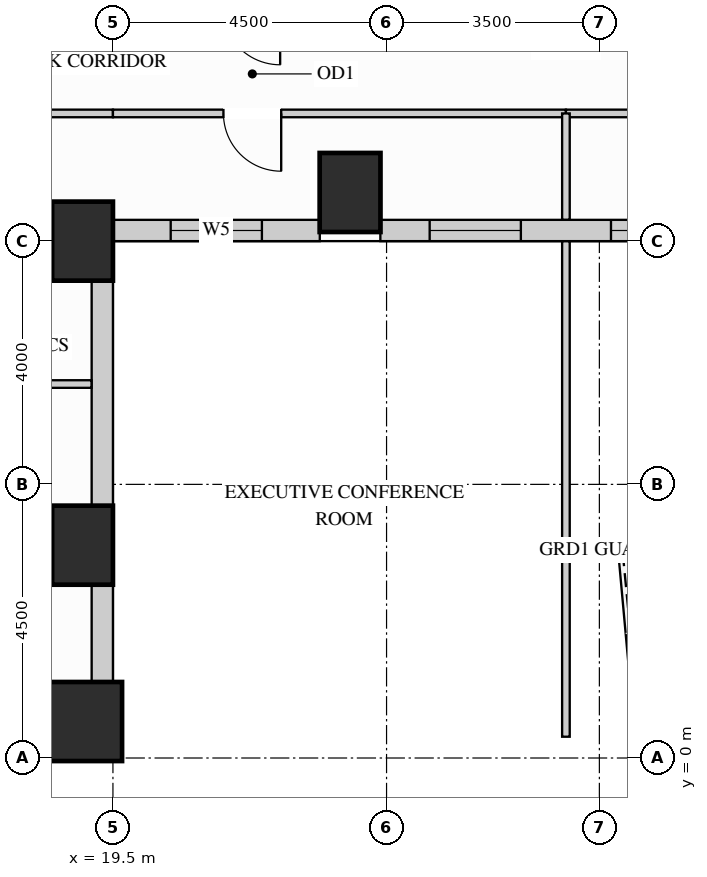
"""IFC4 building model, lengths in metres.
Left out: names, types, materials, properties, quantities, classifications, styles, units other than length and angle.
Written with IfcOpenShell. Run it as: python <this file> out.ifc"""

import sys

from ifc_helpers import new_model, si_unit, direction, frame, frame_2d, origin, origin_2d, place, context, subcontext, project, spatial, rectangle, extrude, source, transform, mapped, element, fill, save


model = new_model("IFC4")
c1 = context("Model", 3, precision=1e-05, world=origin(), true_north=direction((0.0, 1.0)))
c2 = subcontext(c1, "Body", "Model", "MODEL_VIEW")
j1 = project(units=[si_unit("LENGTHUNIT", "METRE"), si_unit("PLANEANGLEUNIT", "RADIAN")], contexts=[c1])
p1 = place(None, origin())
s1 = spatial("IfcSite", under=j1, at=p1, CompositionType="ELEMENT")
p2 = place(p1, origin())
s2 = spatial("IfcBuilding", under=s1, at=p2, CompositionType="ELEMENT")
p3 = place(p2, frame((0.0, 0.0, 62.1)))
s3 = spatial("IfcBuildingStorey", under=s2, at=p3, CompositionType="ELEMENT", Elevation=62.1)
m1 = source(origin(), c2, "Body", "SweptSolid", [
    extrude(rectangle(XDim=1.0, YDim=1.3, at=origin_2d()), origin(), (0.0, 0.0, 1.0), 3.38),
])
for number, where, z_axis, x_axis in (
    (1, (19.0, 3.5, 0.0), (0.0, 0.0, 1.0), (1.0, 0.0, 0.0)),
    (2, (19.0, 8.5, 0.0), (0.0, 0.0, 1.0), (1.0, 0.0, 0.0)),
    (3, (23.4, 9.3, 0.0), (0.0, 0.0, 1.0), (1.0, 0.0, 0.0)),
):
    element("IfcColumn", number, at=place(p3, frame(where, z_axis=z_axis, x_axis=x_axis)), inside=s3, PredefinedType="COLUMN", context=c2, shape_type="MappedRepresentation", body=[
        mapped(m1, transform((0.0, 0.0, 0.0), x_axis=(1.0, 0.0, 0.0), y_axis=(0.0, 1.0, 0.0), z_axis=(0.0, 0.0, 1.0))),
    ])
m2 = source(origin(), c2, "Body", "SweptSolid", [
    extrude(rectangle(XDim=1.3, YDim=1.3, at=origin_2d()), origin(), (0.0, 0.0, 1.0), 3.38),
])
p4 = place(p3, frame((19.0, 0.6, 0.0), z_axis=(0.0, 0.0, 1.0), x_axis=(1.0, 0.0, 0.0)))
e4 = element("IfcColumn", 4, at=p4, inside=s3, PredefinedType="COLUMN", context=c2, shape_type="MappedRepresentation", body=[
    mapped(m2, transform((0.0, 0.0, 0.0), x_axis=(1.0, 0.0, 0.0), y_axis=(0.0, 1.0, 0.0), z_axis=(0.0, 0.0, 1.0))),
])
m3 = source(origin(), c2, "Body", "SweptSolid", [
    extrude(rectangle(XDim=1.604, YDim=0.35, at=frame_2d((0.802, 0.0))), origin(), (0.0, 0.0, 1.0), 2.51),
])
p5 = place(p3, frame((19.325, 1.248, 0.0), z_axis=(0.0, 0.0, 1.0), x_axis=(0.0, 1.0, 0.0)))
e5 = element("IfcWall", 5, at=p5, inside=s3, PredefinedType="SOLIDWALL", context=c2, shape_type="MappedRepresentation", body=[
    mapped(m3, transform((0.0, 0.0, 0.0), x_axis=(1.0, 0.0, 0.0), y_axis=(0.0, 1.0, 0.0), z_axis=(0.0, 0.0, 1.0))),
])
m4 = source(origin(), c2, "Body", "SweptSolid", [
    extrude(rectangle(XDim=3.704, YDim=0.35, at=frame_2d((1.852, 0.0))), origin(), (0.0, 0.0, 1.0), 2.51),
])
p6 = place(p3, frame((19.325, 4.148, 0.0), z_axis=(0.0, 0.0, 1.0), x_axis=(0.0, 1.0, 0.0)))
e6 = element("IfcWall", 6, at=p6, inside=s3, PredefinedType="SOLIDWALL", context=c2, shape_type="MappedRepresentation", body=[
    mapped(m4, transform((0.0, 0.0, 0.0), x_axis=(1.0, 0.0, 0.0), y_axis=(0.0, 1.0, 0.0), z_axis=(0.0, 0.0, 1.0))),
])
p7 = place(p3, frame((19.498, 8.675, 0.0), z_axis=(0.0, 0.0, 1.0), x_axis=(1.0, 0.0, 0.0)))
e7 = element("IfcWall", 7, at=p7, inside=s3, PredefinedType="SOLIDWALL", context=c2, shape_type="SweptSolid", body=[
    extrude(rectangle(XDim=3.404, YDim=0.35, at=frame_2d((1.702, 0.0))), origin(), (0.0, 0.0, 1.0), 3.365),
])
p8 = place(p7, frame((0.952, 0.0, 0.78)))
e8 = element("IfcOpeningElement", 8, at=p8, cuts=e7, PredefinedType="OPENING", context=c2, shape_type="SweptSolid", body=[
    extrude(rectangle(XDim=1.5, YDim=2.0, at=frame_2d((0.75, 1.0))), frame((0.0, 0.185, 0.0), z_axis=(0.0, -1.0, 0.0), x_axis=(1.0, 0.0, 0.0)), (0.0, 0.0, 1.0), 0.37),
])
p9 = place(p3, frame((23.898, 8.675, 0.0), z_axis=(0.0, 0.0, 1.0), x_axis=(1.0, 0.0, 0.0)))
e9 = element("IfcWall", 9, at=p9, inside=s3, PredefinedType="SOLIDWALL", context=c2, shape_type="SweptSolid", body=[
    extrude(rectangle(XDim=6.104, YDim=0.35, at=frame_2d((3.052, 0.0))), origin(), (0.0, 0.0, 1.0), 3.365),
])
p10 = place(p9, frame((0.811, 0.0, 0.78)))
e10 = element("IfcOpeningElement", 10, at=p10, cuts=e9, PredefinedType="OPENING", context=c2, shape_type="SweptSolid", body=[
    extrude(rectangle(XDim=1.5, YDim=2.0, at=frame_2d((0.75, 1.0))), frame((0.0, 0.185, 0.0), z_axis=(0.0, -1.0, 0.0), x_axis=(1.0, 0.0, 0.0)), (0.0, 0.0, 1.0), 0.37),
])
p11 = place(p9, frame((3.793, 0.0, 0.78)))
e11 = element("IfcOpeningElement", 11, at=p11, cuts=e9, PredefinedType="OPENING", context=c2, shape_type="SweptSolid", body=[
    extrude(rectangle(XDim=1.5, YDim=2.0, at=frame_2d((0.75, 1.0))), frame((0.0, 0.185, 0.0), z_axis=(0.0, -1.0, 0.0), x_axis=(1.0, 0.0, 0.0)), (0.0, 0.0, 1.0), 0.37),
])
m5 = source(origin(), c2, "Body", "SweptSolid", [
    extrude(rectangle(XDim=2.45, YDim=0.125, at=frame_2d((1.225, 0.0))), origin(), (0.0, 0.0, 1.0), 3.365),
])
p12 = place(p3, frame((17.05, 10.6, 0.0), z_axis=(0.0, 0.0, 1.0), x_axis=(1.0, 0.0, 0.0)))
e12 = element("IfcWall", 12, at=p12, inside=s3, PredefinedType="PARTITIONING", context=c2, shape_type="MappedRepresentation", body=[
    mapped(m5, transform((0.0, 0.0, 0.0), x_axis=(1.0, 0.0, 0.0), y_axis=(0.0, 1.0, 0.0), z_axis=(0.0, 0.0, 1.0))),
])
p13 = place(p3, frame((19.5, 10.6, 0.0), z_axis=(0.0, 0.0, 1.0), x_axis=(1.0, 0.0, 0.0)))
e13 = element("IfcWall", 13, at=p13, inside=s3, PredefinedType="PARTITIONING", context=c2, shape_type="SweptSolid", body=[
    extrude(rectangle(XDim=7.45, YDim=0.125, at=frame_2d((3.725, 0.0))), origin(), (0.0, 0.0, 1.0), 3.365),
])
p14 = place(p13, frame((1.817, 0.0, 0.0)))
e14 = element("IfcOpeningElement", 14, at=p14, cuts=e13, PredefinedType="OPENING", context=c2, shape_type="SweptSolid", body=[
    extrude(rectangle(XDim=0.95, YDim=2.15, at=frame_2d((0.475, 1.075))), frame((0.0, 0.073, 0.0), z_axis=(0.0, -1.0, 0.0), x_axis=(1.0, 0.0, 0.0)), (0.0, 0.0, 1.0), 0.145),
])
p15 = place(p3, frame((26.95, 10.6, 0.0), z_axis=(0.0, 0.0, 1.0), x_axis=(1.0, 0.0, 0.0)))
e15 = element("IfcWall", 15, at=p15, inside=s3, PredefinedType="PARTITIONING", context=c2, shape_type="SweptSolid", body=[
    extrude(rectangle(XDim=7.45, YDim=0.125, at=frame_2d((3.725, 0.0))), origin(), (0.0, 0.0, 1.0), 3.365),
])
p16 = place(p15, frame((4.683, 0.0, 0.0)))
e16 = element("IfcOpeningElement", 16, at=p16, cuts=e15, PredefinedType="OPENING", context=c2, shape_type="SweptSolid", body=[
    extrude(rectangle(XDim=0.95, YDim=2.15, at=frame_2d((0.475, 1.075))), frame((0.0, 0.073, 0.0), z_axis=(0.0, -1.0, 0.0), x_axis=(1.0, 0.0, 0.0)), (0.0, 0.0, 1.0), 0.145),
])
m6 = source(origin(), c2, "Body", "SweptSolid", [
    extrude(rectangle(XDim=8.148, YDim=0.125, at=frame_2d((4.074, 0.0))), origin(), (0.0, 0.0, 1.0), 3.365),
])
p17 = place(p3, frame((26.95, 0.35, 0.0), z_axis=(0.0, 0.0, 1.0), x_axis=(0.0, 1.0, 0.0)))
e17 = element("IfcWall", 17, at=p17, inside=s3, PredefinedType="PARTITIONING", context=c2, shape_type="MappedRepresentation", body=[
    mapped(m6, transform((0.0, 0.0, 0.0), x_axis=(1.0, 0.0, 0.0), y_axis=(0.0, 1.0, 0.0), z_axis=(0.0, 0.0, 1.0))),
])
m7 = source(origin(), c2, "Body", "SweptSolid", [
    extrude(rectangle(XDim=1.748, YDim=0.125, at=frame_2d((0.874, 0.0))), origin(), (0.0, 0.0, 1.0), 3.365),
])
p18 = place(p3, frame((26.95, 8.852, 0.0), z_axis=(0.0, 0.0, 1.0), x_axis=(0.0, 1.0, 0.0)))
e18 = element("IfcWall", 18, at=p18, inside=s3, PredefinedType="PARTITIONING", context=c2, shape_type="MappedRepresentation", body=[
    mapped(m7, transform((0.0, 0.0, 0.0), x_axis=(1.0, 0.0, 0.0), y_axis=(0.0, 1.0, 0.0), z_axis=(0.0, 0.0, 1.0))),
])
m8 = source(origin(), c2, "Body", "SweptSolid", [
    extrude(rectangle(XDim=2.098, YDim=0.125, at=frame_2d((1.049, 0.0))), origin(), (0.0, 0.0, 1.0), 3.365),
])
p19 = place(p3, frame((17.05, 6.15, 0.0), z_axis=(0.0, 0.0, 1.0), x_axis=(1.0, 0.0, 0.0)))
e19 = element("IfcWall", 19, at=p19, inside=s3, PredefinedType="PARTITIONING", context=c2, shape_type="MappedRepresentation", body=[
    mapped(m8, transform((0.0, 0.0, 0.0), x_axis=(1.0, 0.0, 0.0), y_axis=(0.0, 1.0, 0.0), z_axis=(0.0, 0.0, 1.0))),
])
m9 = source(origin(), c2, "Body", "SweptSolid", [
    extrude(rectangle(XDim=0.95, YDim=2.15, at=frame_2d((0.475, 1.075))), frame((0.0, 0.025, 0.0), z_axis=(0.0, -1.0, 0.0), x_axis=(1.0, 0.0, 0.0)), (0.0, 0.0, 1.0), 0.05),
])
p20 = place(p14, origin())
e20 = element("IfcDoor", 20, at=p20, inside=s3, OperationType="SINGLE_SWING_RIGHT", PredefinedType="DOOR", context=c2, shape_type="MappedRepresentation", body=[
    mapped(m9, transform((0.0, 0.0, 0.0), x_axis=(1.0, 0.0, 0.0), y_axis=(0.0, 1.0, 0.0), z_axis=(0.0, 0.0, 1.0))),
])
fill(e14, e20)
m10 = source(origin(), c2, "Body", "SweptSolid", [
    extrude(rectangle(XDim=1.5, YDim=2.0, at=frame_2d((0.75, 1.0))), frame((0.0, 0.03, 0.0), z_axis=(0.0, -1.0, 0.0), x_axis=(1.0, 0.0, 0.0)), (0.0, 0.0, 1.0), 0.06),
])
p21 = place(p8, origin())
e21 = element("IfcWindow", 21, at=p21, inside=s3, PartitioningType="SINGLE_PANEL", PredefinedType="WINDOW", context=c2, shape_type="MappedRepresentation", body=[
    mapped(m10, transform((0.0, 0.0, 0.0), x_axis=(1.0, 0.0, 0.0), y_axis=(0.0, 1.0, 0.0), z_axis=(0.0, 0.0, 1.0))),
])
fill(e8, e21)
p22 = place(p10, origin())
e22 = element("IfcWindow", 22, at=p22, inside=s3, PartitioningType="SINGLE_PANEL", PredefinedType="WINDOW", context=c2, shape_type="MappedRepresentation", body=[
    mapped(m10, transform((0.0, 0.0, 0.0), x_axis=(1.0, 0.0, 0.0), y_axis=(0.0, 1.0, 0.0), z_axis=(0.0, 0.0, 1.0))),
])
fill(e10, e22)
p23 = place(p11, origin())
e23 = element("IfcWindow", 23, at=p23, inside=s3, PartitioningType="SINGLE_PANEL", PredefinedType="WINDOW", context=c2, shape_type="MappedRepresentation", body=[
    mapped(m10, transform((0.0, 0.0, 0.0), x_axis=(1.0, 0.0, 0.0), y_axis=(0.0, 1.0, 0.0), z_axis=(0.0, 0.0, 1.0))),
])
fill(e11, e23)
save(model, sys.argv[1])
